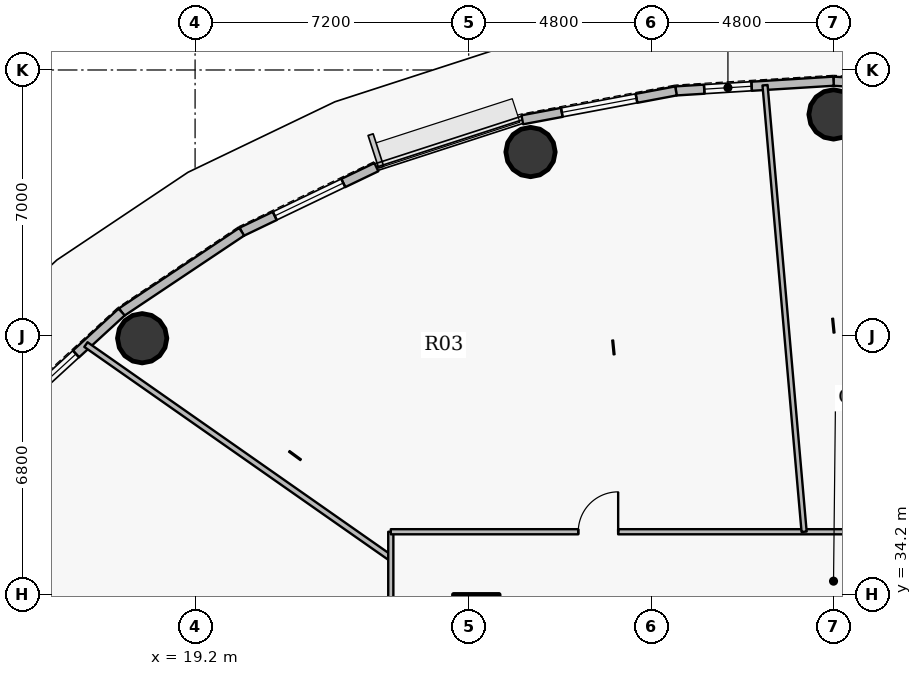
"""IFC4 building model, lengths in metres.
Left out: names, types, materials, properties, quantities, classifications, styles, units other than length and angle.
Written with IfcOpenShell. Run it as: python <this file> out.ifc"""

import sys

from ifc_helpers import new_model, si_unit, direction, frame, frame_2d, origin, origin_2d, place, context, subcontext, project, spatial, rectangle, hollow_circle, extrude, source, transform, mapped, element, fill, save


model = new_model("IFC4")
c1 = context("Model", 3, precision=1e-05, world=origin(), true_north=direction((0.0, 1.0)))
c2 = subcontext(c1, "Body", "Model", "MODEL_VIEW")
j1 = project(units=[si_unit("LENGTHUNIT", "METRE"), si_unit("PLANEANGLEUNIT", "RADIAN")], contexts=[c1])
p1 = place(None, origin())
s1 = spatial("IfcSite", under=j1, at=p1, CompositionType="ELEMENT")
p2 = place(p1, origin())
s2 = spatial("IfcBuilding", under=s1, at=p2, CompositionType="ELEMENT")
p3 = place(p2, frame((0.0, 0.0, 151.35)))
s3 = spatial("IfcBuildingStorey", under=s2, at=p3, CompositionType="ELEMENT", Elevation=151.35)
p4 = place(p3, frame((26.6, 33.6, 0.0), z_axis=(0.0, 0.0, 1.0), x_axis=(1.0, 0.0, 0.0)))
e1 = element("IfcColumn", 1, at=p4, inside=s3, PredefinedType="COLUMN", context=c2, shape_type="SweptSolid", body=[
    extrude(rectangle(XDim=1.2, YDim=1.2, at=origin_2d()), origin(), (0.0, 0.0, 1.0), 4.8),
])
for number, where, z_axis, x_axis in (
    (2, (36.0, 46.83, -0.3), (0.0, 0.0, 1.0), (1.0, 0.0, 0.0)),
    (3, (28.027, 45.841, -0.3), (0.0, 0.0, 1.0), (1.0, 0.0, 0.0)),
    (4, (17.808, 40.942, -0.3), (0.0, 0.0, 1.0), (1.0, 0.0, 0.0)),
):
    element("IfcColumn", number, at=place(p3, frame(where, z_axis=z_axis, x_axis=x_axis)), inside=s3, PredefinedType="COLUMN", context=c2, shape_type="SweptSolid", body=[
        extrude(hollow_circle(Radius=0.65, WallThickness=0.04, at=origin_2d()), origin(), (0.0, 0.0, 1.0), 5.1),
    ])
p5 = place(p3, frame((36.0, 47.705, 0.0), z_axis=(0.0, 0.0, 1.0), x_axis=(0.998104600619, -0.061540281305, 0.0)))
e5 = element("IfcWall", 5, at=p5, inside=s3, PredefinedType="SOLIDWALL", context=c2, shape_type="SweptSolid", body=[
    extrude(rectangle(XDim=4.154, YDim=0.24, at=frame_2d((2.077, 0.0))), origin(), (0.0, 0.0, 1.0), 4.55),
])
p6 = place(p5, frame((1.077, 0.0, 0.9)))
e6 = element("IfcOpeningElement", 6, at=p6, cuts=e5, PredefinedType="OPENING", context=c2, shape_type="SweptSolid", body=[
    extrude(rectangle(XDim=2.0, YDim=1.75, at=origin_2d()), frame((1.0, 0.13, 0.875), z_axis=(0.0, -1.0, 0.0), x_axis=(1.0, 0.0, 0.0)), (0.0, 0.0, 1.0), 0.26),
])
p7 = place(p3, frame((31.854, 47.449, 0.0), z_axis=(0.0, 0.0, 1.0), x_axis=(0.998104600619, 0.061540281305, 0.0)))
e7 = element("IfcWall", 7, at=p7, inside=s3, PredefinedType="SOLIDWALL", context=c2, shape_type="SweptSolid", body=[
    extrude(rectangle(XDim=4.154, YDim=0.24, at=frame_2d((2.077, 0.0))), origin(), (0.0, 0.0, 1.0), 4.55),
])
p8 = place(p7, frame((0.745, 0.0, 0.9)))
e8 = element("IfcOpeningElement", 8, at=p8, cuts=e7, PredefinedType="OPENING", context=c2, shape_type="SweptSolid", body=[
    extrude(rectangle(XDim=1.25, YDim=1.65, at=origin_2d()), frame((0.625, 0.13, 0.825), z_axis=(0.0, -1.0, 0.0), x_axis=(1.0, 0.0, 0.0)), (0.0, 0.0, 1.0), 0.26),
])
p9 = place(p3, frame((27.811, 46.689, 0.0), z_axis=(0.0, 0.0, 1.0), x_axis=(0.982788108205, 0.184736391573, 0.0)))
e9 = element("IfcWall", 9, at=p9, inside=s3, PredefinedType="SOLIDWALL", context=c2, shape_type="SweptSolid", body=[
    extrude(rectangle(XDim=4.114, YDim=0.24, at=frame_2d((2.057, 0.0))), origin(), (0.0, 0.0, 1.0), 4.55),
])
p10 = place(p9, frame((1.057, 0.0, 0.9)))
e10 = element("IfcOpeningElement", 10, at=p10, cuts=e9, PredefinedType="OPENING", context=c2, shape_type="SweptSolid", body=[
    extrude(rectangle(XDim=2.0, YDim=1.75, at=origin_2d()), frame((1.0, 0.13, 0.875), z_axis=(0.0, -1.0, 0.0), x_axis=(1.0, 0.0, 0.0)), (0.0, 0.0, 1.0), 0.26),
])
p11 = place(p3, frame((20.427, 43.743, 0.0), z_axis=(0.0, 0.0, 1.0), x_axis=(0.901564733809, 0.432644231155, 0.0)))
e11 = element("IfcWall", 11, at=p11, inside=s3, PredefinedType="SOLIDWALL", context=c2, shape_type="SweptSolid", body=[
    extrude(rectangle(XDim=3.93, YDim=0.24, at=frame_2d((1.965, 0.0))), origin(), (0.0, 0.0, 1.0), 4.55),
])
p12 = place(p11, frame((0.965, 0.0, 0.9)))
e12 = element("IfcOpeningElement", 12, at=p12, cuts=e11, PredefinedType="OPENING", context=c2, shape_type="SweptSolid", body=[
    extrude(rectangle(XDim=2.0, YDim=1.75, at=origin_2d()), frame((1.0, 0.13, 0.875), z_axis=(0.0, -1.0, 0.0), x_axis=(1.0, 0.0, 0.0)), (0.0, 0.0, 1.0), 0.26),
])
p13 = place(p3, frame((17.268, 41.631, 0.0), z_axis=(0.0, 0.0, 1.0), x_axis=(0.831228998277, 0.555930168657, 0.0)))
e13 = element("IfcWall", 13, at=p13, inside=s3, PredefinedType="SOLIDWALL", context=c2, shape_type="SweptSolid", body=[
    extrude(rectangle(XDim=3.8, YDim=0.24, at=frame_2d((1.9, 0.0))), origin(), (0.0, 0.0, 1.0), 4.55),
])
p14 = place(p3, frame((14.572, 39.158, 0.0), z_axis=(0.0, 0.0, 1.0), x_axis=(0.737076565834, 0.675809245349, 0.0)))
e14 = element("IfcWall", 14, at=p14, inside=s3, PredefinedType="SOLIDWALL", context=c2, shape_type="SweptSolid", body=[
    extrude(rectangle(XDim=3.658, YDim=0.24, at=frame_2d((1.829, 0.0))), origin(), (0.0, 0.0, 1.0), 4.55),
])
p15 = place(p14, frame((0.778, 0.0, 0.9)))
e15 = element("IfcOpeningElement", 15, at=p15, cuts=e14, PredefinedType="OPENING", context=c2, shape_type="SweptSolid", body=[
    extrude(rectangle(XDim=1.25, YDim=1.65, at=origin_2d()), frame((0.625, 0.13, 0.825), z_axis=(0.0, -1.0, 0.0), x_axis=(1.0, 0.0, 0.0)), (0.0, 0.0, 1.0), 0.26),
])
p16 = place(p3, frame((16.327, 40.775, 0.0), z_axis=(0.0, 0.0, 1.0), x_axis=(0.81915813363, -0.573567739773, 0.0)))
e16 = element("IfcWall", 16, at=p16, inside=s3, PredefinedType="PARTITIONING", context=c2, shape_type="SweptSolid", body=[
    extrude(rectangle(XDim=9.794, YDim=0.15, at=frame_2d((4.897, 0.0))), origin(), (0.0, 0.0, 1.0), 3.985),
])
p17 = place(p3, frame((24.35, 27.95, 0.0), z_axis=(0.0, 0.0, 1.0), x_axis=(0.0, 1.0, 0.0)))
e17 = element("IfcWall", 17, at=p17, inside=s3, PredefinedType="PARTITIONING", context=c2, shape_type="SweptSolid", body=[
    extrude(rectangle(XDim=7.9, YDim=0.135, at=frame_2d((3.95, 0.0))), origin(), (0.0, 0.0, 1.0), 3.985),
])
p18 = place(p3, frame((24.35, 35.85, 0.0), z_axis=(0.0, 0.0, 1.0), x_axis=(1.0, 0.0, 0.0)))
e18 = element("IfcWall", 18, at=p18, inside=s3, PredefinedType="PARTITIONING", context=c2, shape_type="SweptSolid", body=[
    extrude(rectangle(XDim=29.104, YDim=0.135, at=frame_2d((14.552, 0.0))), origin(), (0.0, 0.0, 1.0), 3.985),
])
p19 = place(p18, frame((19.445, 0.0, 0.0)))
e19 = element("IfcOpeningElement", 19, at=p19, cuts=e18, PredefinedType="OPENING", context=c2, shape_type="SweptSolid", body=[
    extrude(rectangle(XDim=1.05, YDim=2.15, at=origin_2d()), frame((0.525, 0.078, 1.075), z_axis=(0.0, -1.0, 0.0), x_axis=(1.0, 0.0, 0.0)), (0.0, 0.0, 1.0), 0.155),
])
p20 = place(p18, frame((4.933, 0.0, 0.0)))
e20 = element("IfcOpeningElement", 20, at=p20, cuts=e18, PredefinedType="OPENING", context=c2, shape_type="SweptSolid", body=[
    extrude(rectangle(XDim=1.05, YDim=2.15, at=origin_2d()), frame((0.525, 0.078, 1.075), z_axis=(0.0, -1.0, 0.0), x_axis=(1.0, 0.0, 0.0)), (0.0, 0.0, 1.0), 0.155),
])
p21 = place(p3, frame((34.198, 47.599, 0.0), z_axis=(0.0, 0.0, 1.0), x_axis=(0.087171829407, -0.996193290561, 0.0)))
e21 = element("IfcWall", 21, at=p21, inside=s3, PredefinedType="PARTITIONING", context=c2, shape_type="SweptSolid", body=[
    extrude(rectangle(XDim=11.794, YDim=0.135, at=frame_2d((5.897, 0.0))), origin(), (0.0, 0.0, 1.0), 3.985),
])
m1 = source(origin(), c2, "Body", "SweptSolid", [
    extrude(rectangle(XDim=1.25, YDim=1.65, at=origin_2d()), frame((0.625, 0.03, 0.825), z_axis=(0.0, -1.0, 0.0), x_axis=(1.0, 0.0, 0.0)), (0.0, 0.0, 1.0), 0.06),
])
p22 = place(p8, origin())
e22 = element("IfcWindow", 22, at=p22, inside=s3, PartitioningType="SINGLE_PANEL", PredefinedType="WINDOW", context=c2, shape_type="MappedRepresentation", body=[
    mapped(m1, transform((0.0, 0.0, 0.0), x_axis=(1.0, 0.0, 0.0), y_axis=(0.0, 1.0, 0.0), z_axis=(0.0, 0.0, 1.0), scale=1.0)),
])
fill(e8, e22)
m2 = source(origin(), c2, "Body", "SweptSolid", [
    extrude(rectangle(XDim=2.0, YDim=1.75, at=origin_2d()), frame((1.0, 0.03, 0.875), z_axis=(0.0, -1.0, 0.0), x_axis=(1.0, 0.0, 0.0)), (0.0, 0.0, 1.0), 0.06),
])
p23 = place(p10, origin())
e23 = element("IfcWindow", 23, at=p23, inside=s3, PartitioningType="DOUBLE_PANEL_VERTICAL", PredefinedType="WINDOW", context=c2, shape_type="MappedRepresentation", body=[
    mapped(m2, transform((0.0, 0.0, 0.0), x_axis=(1.0, 0.0, 0.0), y_axis=(0.0, 1.0, 0.0), z_axis=(0.0, 0.0, 1.0), scale=1.0)),
])
fill(e10, e23)
p24 = place(p12, origin())
e24 = element("IfcWindow", 24, at=p24, inside=s3, PartitioningType="DOUBLE_PANEL_VERTICAL", PredefinedType="WINDOW", context=c2, shape_type="MappedRepresentation", body=[
    mapped(m2, transform((0.0, 0.0, 0.0), x_axis=(1.0, 0.0, 0.0), y_axis=(0.0, 1.0, 0.0), z_axis=(0.0, 0.0, 1.0), scale=1.0)),
])
fill(e12, e24)
p25 = place(p15, origin())
e25 = element("IfcWindow", 25, at=p25, inside=s3, PartitioningType="SINGLE_PANEL", PredefinedType="WINDOW", context=c2, shape_type="MappedRepresentation", body=[
    mapped(m1, transform((0.0, 0.0, 0.0), x_axis=(1.0, 0.0, 0.0), y_axis=(0.0, 1.0, 0.0), z_axis=(0.0, 0.0, 1.0), scale=1.0)),
])
fill(e15, e25)
m3 = source(origin(), c2, "Body", "SweptSolid", [
    extrude(rectangle(XDim=1.05, YDim=2.15, at=origin_2d()), frame((0.525, 0.025, 1.075), z_axis=(0.0, -1.0, 0.0), x_axis=(1.0, 0.0, 0.0)), (0.0, 0.0, 1.0), 0.05),
])
p26 = place(p20, origin())
e26 = element("IfcDoor", 26, at=p26, inside=s3, OperationType="SINGLE_SWING_RIGHT", PredefinedType="DOOR", context=c2, shape_type="MappedRepresentation", body=[
    mapped(m3, transform((0.0, 0.0, 0.0), x_axis=(1.0, 0.0, 0.0), y_axis=(0.0, 1.0, 0.0), z_axis=(0.0, 0.0, 1.0), scale=1.0)),
])
fill(e20, e26)
save(model, sys.argv[1])
